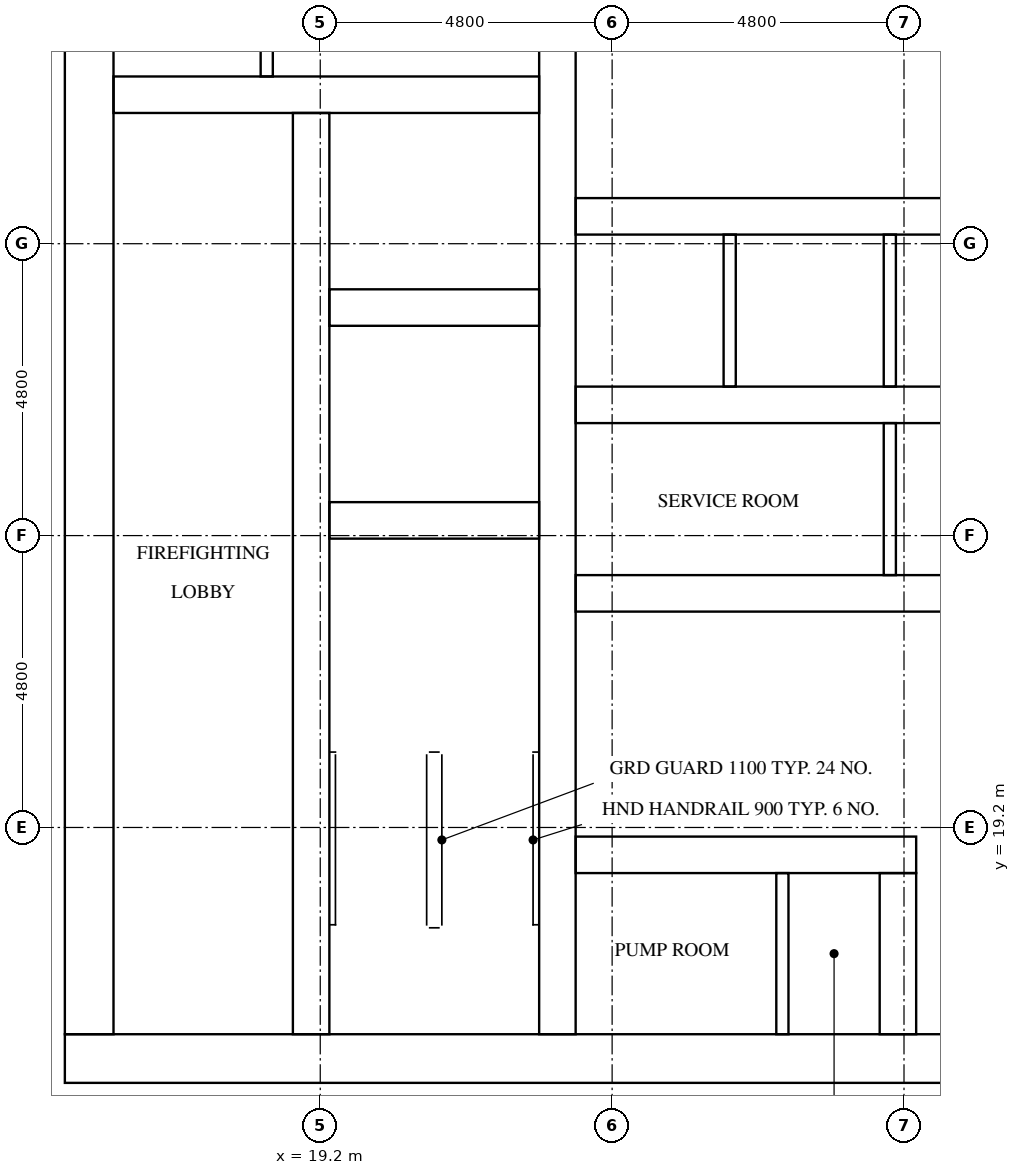
"""IFC4 building model, lengths in metres.
Left out: names, types, materials, properties, quantities, classifications, styles, units other than length and angle.
Written with IfcOpenShell. Run it as: python <this file> out.ifc"""

import sys

from ifc_helpers import new_model, si_unit, direction, frame, frame_2d, origin, place, context, subcontext, project, spatial, rectangle, extrude, element, fill, save


model = new_model("IFC4")
c1 = context("Model", 3, precision=1e-05, world=origin(), true_north=direction((0.0, 1.0)))
c2 = subcontext(c1, "Body", "Model", "MODEL_VIEW")
j1 = project(units=[si_unit("LENGTHUNIT", "METRE"), si_unit("PLANEANGLEUNIT", "RADIAN")], contexts=[c1])
p1 = place(None, origin())
s1 = spatial("IfcSite", under=j1, at=p1, CompositionType="ELEMENT")
p2 = place(p1, origin())
s2 = spatial("IfcBuilding", under=s1, at=p2, CompositionType="ELEMENT")
p3 = place(p2, frame((0.0, 0.0, 149.0)))
s3 = spatial("IfcBuildingStorey", under=s2, at=p3, CompositionType="ELEMENT", Elevation=149.0)
p4 = place(p3, frame((15.0, 15.4, 0.0), z_axis=(0.0, 0.0, 1.0), x_axis=(1.0, 0.0, 0.0)))
e1 = element("IfcWall", 1, at=p4, inside=s3, PredefinedType="SHEAR", context=c2, shape_type="SweptSolid", body=[
    extrude(rectangle(XDim=32.4, YDim=0.8, at=frame_2d((16.2, 0.0))), origin(), (0.0, 0.0, 1.0), 3.2),
])
p5 = place(p4, frame((15.3, 0.0, 0.0)))
e2 = element("IfcOpeningElement", 2, at=p5, cuts=e1, PredefinedType="OPENING", context=c2, shape_type="SweptSolid", body=[
    extrude(rectangle(XDim=1.8, YDim=2.1, at=frame_2d((0.9, 1.05))), frame((0.0, 0.41, 0.0), z_axis=(0.0, -1.0, 0.0), x_axis=(1.0, 0.0, 0.0)), (0.0, 0.0, 1.0), 0.82),
])
p6 = place(p3, frame((15.4, 15.8, 0.0), z_axis=(0.0, 0.0, 1.0), x_axis=(0.0, 1.0, 0.0)))
e3 = element("IfcWall", 3, at=p6, inside=s3, PredefinedType="SHEAR", context=c2, shape_type="SweptSolid", body=[
    extrude(rectangle(XDim=21.2, YDim=0.8, at=frame_2d((10.6, 0.0))), origin(), (0.0, 0.0, 1.0), 3.2),
])
p7 = place(p6, frame((4.96, 0.0, 0.0)))
e4 = element("IfcOpeningElement", 4, at=p7, cuts=e3, PredefinedType="OPENING", context=c2, shape_type="SweptSolid", body=[
    extrude(rectangle(XDim=1.2, YDim=2.1, at=frame_2d((0.6, 1.05))), frame((0.0, 0.41, 0.0), z_axis=(0.0, -1.0, 0.0), x_axis=(1.0, 0.0, 0.0)), (0.0, 0.0, 1.0), 0.82),
])
p8 = place(p3, frame((19.05, 15.8, 0.0), z_axis=(0.0, 0.0, 1.0), x_axis=(0.0, 1.0, 0.0)))
e5 = element("IfcWall", 5, at=p8, inside=s3, PredefinedType="SHEAR", context=c2, shape_type="SweptSolid", body=[
    extrude(rectangle(XDim=15.15, YDim=0.6, at=frame_2d((7.575, 0.0))), origin(), (0.0, 0.0, 1.0), 3.2),
])
p9 = place(p8, frame((9.65, 0.0, 0.0)))
e6 = element("IfcOpeningElement", 6, at=p9, cuts=e5, PredefinedType="OPENING", context=c2, shape_type="SweptSolid", body=[
    extrude(rectangle(XDim=1.1, YDim=2.1, at=frame_2d((0.55, 1.05))), frame((0.0, 0.31, 0.0), z_axis=(0.0, -1.0, 0.0), x_axis=(1.0, 0.0, 0.0)), (0.0, 0.0, 1.0), 0.62),
])
p10 = place(p8, frame((13.15, 0.0, 0.0)))
e7 = element("IfcOpeningElement", 7, at=p10, cuts=e5, PredefinedType="OPENING", context=c2, shape_type="SweptSolid", body=[
    extrude(rectangle(XDim=1.1, YDim=2.1, at=frame_2d((0.55, 1.05))), frame((0.0, 0.31, 0.0), z_axis=(0.0, -1.0, 0.0), x_axis=(1.0, 0.0, 0.0)), (0.0, 0.0, 1.0), 0.62),
])
p11 = place(p8, frame((0.4, 0.0, 0.0)))
e8 = element("IfcOpeningElement", 8, at=p11, cuts=e5, PredefinedType="OPENING", context=c2, shape_type="SweptSolid", body=[
    extrude(rectangle(XDim=1.2, YDim=2.1, at=frame_2d((0.6, 1.05))), frame((0.0, 0.31, 0.0), z_axis=(0.0, -1.0, 0.0), x_axis=(1.0, 0.0, 0.0)), (0.0, 0.0, 1.0), 0.62),
])
p12 = place(p3, frame((23.1, 15.8, 0.0), z_axis=(0.0, 0.0, 1.0), x_axis=(0.0, 1.0, 0.0)))
e9 = element("IfcWall", 9, at=p12, inside=s3, PredefinedType="SHEAR", context=c2, shape_type="SweptSolid", body=[
    extrude(rectangle(XDim=21.2, YDim=0.6, at=frame_2d((10.6, 0.0))), origin(), (0.0, 0.0, 1.0), 3.2),
])
for number, where, z_axis, x_axis in (
    (10, (19.35, 24.25, 0.0), (0.0, 0.0, 1.0), (1.0, 0.0, 0.0)),
    (11, (19.35, 27.75, 0.0), (0.0, 0.0, 1.0), (1.0, 0.0, 0.0)),
):
    element("IfcWall", number, at=place(p3, frame(where, z_axis=z_axis, x_axis=x_axis)), inside=s3, PredefinedType="SHEAR", context=c2, shape_type="SweptSolid", body=[
        extrude(rectangle(XDim=3.45, YDim=0.6, at=frame_2d((1.725, 0.0))), origin(), (0.0, 0.0, 1.0), 3.2),
    ])
p13 = place(p3, frame((15.8, 31.25, 0.0), z_axis=(0.0, 0.0, 1.0), x_axis=(1.0, 0.0, 0.0)))
e12 = element("IfcWall", 12, at=p13, inside=s3, PredefinedType="SHEAR", context=c2, shape_type="SweptSolid", body=[
    extrude(rectangle(XDim=7.0, YDim=0.6, at=frame_2d((3.5, 0.0))), origin(), (0.0, 0.0, 1.0), 3.2),
])
p14 = place(p3, frame((23.4, 18.75, 0.0), z_axis=(0.0, 0.0, 1.0), x_axis=(1.0, 0.0, 0.0)))
e13 = element("IfcWall", 13, at=p14, inside=s3, PredefinedType="SHEAR", context=c2, shape_type="SweptSolid", body=[
    extrude(rectangle(XDim=5.6, YDim=0.6, at=frame_2d((2.8, 0.0))), origin(), (0.0, 0.0, 1.0), 3.2),
])
p15 = place(p14, frame((1.15, 0.0, 0.0)))
e14 = element("IfcOpeningElement", 14, at=p15, cuts=e13, PredefinedType="OPENING", context=c2, shape_type="SweptSolid", body=[
    extrude(rectangle(XDim=1.0, YDim=2.1, at=frame_2d((0.5, 1.05))), frame((0.0, 0.31, 0.0), z_axis=(0.0, -1.0, 0.0), x_axis=(1.0, 0.0, 0.0)), (0.0, 0.0, 1.0), 0.62),
])
p16 = place(p14, frame((3.75, 0.0, 0.0)))
e15 = element("IfcOpeningElement", 15, at=p16, cuts=e13, PredefinedType="OPENING", context=c2, shape_type="SweptSolid", body=[
    extrude(rectangle(XDim=1.0, YDim=2.1, at=frame_2d((0.5, 1.05))), frame((0.0, 0.31, 0.0), z_axis=(0.0, -1.0, 0.0), x_axis=(1.0, 0.0, 0.0)), (0.0, 0.0, 1.0), 0.62),
])
p17 = place(p3, frame((23.4, 23.05, 0.0), z_axis=(0.0, 0.0, 1.0), x_axis=(1.0, 0.0, 0.0)))
e16 = element("IfcWall", 16, at=p17, inside=s3, PredefinedType="SHEAR", context=c2, shape_type="SweptSolid", body=[
    extrude(rectangle(XDim=15.6, YDim=0.6, at=frame_2d((7.8, 0.0))), origin(), (0.0, 0.0, 1.0), 3.2),
])
p18 = place(p17, frame((2.033, 0.0, 0.0)))
e17 = element("IfcOpeningElement", 17, at=p18, cuts=e16, PredefinedType="OPENING", context=c2, shape_type="SweptSolid", body=[
    extrude(rectangle(XDim=1.0, YDim=2.1, at=frame_2d((0.5, 1.05))), frame((0.0, 0.31, 0.0), z_axis=(0.0, -1.0, 0.0), x_axis=(1.0, 0.0, 0.0)), (0.0, 0.0, 1.0), 0.62),
])
p19 = place(p17, frame((11.706, 0.0, 0.0)))
e18 = element("IfcOpeningElement", 18, at=p19, cuts=e16, PredefinedType="OPENING", context=c2, shape_type="SweptSolid", body=[
    extrude(rectangle(XDim=1.0, YDim=2.1, at=frame_2d((0.5, 1.05))), frame((0.0, 0.31, 0.0), z_axis=(0.0, -1.0, 0.0), x_axis=(1.0, 0.0, 0.0)), (0.0, 0.0, 1.0), 0.62),
])
p20 = place(p17, frame((14.339, 0.0, 0.0)))
e19 = element("IfcOpeningElement", 19, at=p20, cuts=e16, PredefinedType="OPENING", context=c2, shape_type="SweptSolid", body=[
    extrude(rectangle(XDim=1.0, YDim=2.1, at=frame_2d((0.5, 1.05))), frame((0.0, 0.31, 0.0), z_axis=(0.0, -1.0, 0.0), x_axis=(1.0, 0.0, 0.0)), (0.0, 0.0, 1.0), 0.62),
])
p21 = place(p3, frame((23.4, 26.15, 0.0), z_axis=(0.0, 0.0, 1.0), x_axis=(1.0, 0.0, 0.0)))
e20 = element("IfcWall", 20, at=p21, inside=s3, PredefinedType="SHEAR", context=c2, shape_type="SweptSolid", body=[
    extrude(rectangle(XDim=15.6, YDim=0.6, at=frame_2d((7.8, 0.0))), origin(), (0.0, 0.0, 1.0), 3.2),
])
p22 = place(p3, frame((23.4, 29.25, 0.0), z_axis=(0.0, 0.0, 1.0), x_axis=(1.0, 0.0, 0.0)))
e21 = element("IfcWall", 21, at=p22, inside=s3, PredefinedType="SHEAR", context=c2, shape_type="SweptSolid", body=[
    extrude(rectangle(XDim=15.6, YDim=0.6, at=frame_2d((7.8, 0.0))), origin(), (0.0, 0.0, 1.0), 3.2),
])
p23 = place(p22, frame((0.667, 0.0, 0.0)))
e22 = element("IfcOpeningElement", 22, at=p23, cuts=e21, PredefinedType="OPENING", context=c2, shape_type="SweptSolid", body=[
    extrude(rectangle(XDim=1.1, YDim=2.1, at=frame_2d((0.55, 1.05))), frame((0.0, 0.31, 0.0), z_axis=(0.0, -1.0, 0.0), x_axis=(1.0, 0.0, 0.0)), (0.0, 0.0, 1.0), 0.62),
])
p24 = place(p22, frame((3.3, 0.0, 0.0)))
e23 = element("IfcOpeningElement", 23, at=p24, cuts=e21, PredefinedType="OPENING", context=c2, shape_type="SweptSolid", body=[
    extrude(rectangle(XDim=1.1, YDim=2.1, at=frame_2d((0.55, 1.05))), frame((0.0, 0.31, 0.0), z_axis=(0.0, -1.0, 0.0), x_axis=(1.0, 0.0, 0.0)), (0.0, 0.0, 1.0), 0.62),
])
p25 = place(p22, frame((5.933, 0.0, 0.0)))
e24 = element("IfcOpeningElement", 24, at=p25, cuts=e21, PredefinedType="OPENING", context=c2, shape_type="SweptSolid", body=[
    extrude(rectangle(XDim=1.1, YDim=2.1, at=frame_2d((0.55, 1.05))), frame((0.0, 0.31, 0.0), z_axis=(0.0, -1.0, 0.0), x_axis=(1.0, 0.0, 0.0)), (0.0, 0.0, 1.0), 0.62),
])
p26 = place(p22, frame((8.567, 0.0, 0.0)))
e25 = element("IfcOpeningElement", 25, at=p26, cuts=e21, PredefinedType="OPENING", context=c2, shape_type="SweptSolid", body=[
    extrude(rectangle(XDim=1.1, YDim=2.1, at=frame_2d((0.55, 1.05))), frame((0.0, 0.31, 0.0), z_axis=(0.0, -1.0, 0.0), x_axis=(1.0, 0.0, 0.0)), (0.0, 0.0, 1.0), 0.62),
])
p27 = place(p22, frame((11.2, 0.0, 0.0)))
e26 = element("IfcOpeningElement", 26, at=p27, cuts=e21, PredefinedType="OPENING", context=c2, shape_type="SweptSolid", body=[
    extrude(rectangle(XDim=1.1, YDim=2.1, at=frame_2d((0.55, 1.05))), frame((0.0, 0.31, 0.0), z_axis=(0.0, -1.0, 0.0), x_axis=(1.0, 0.0, 0.0)), (0.0, 0.0, 1.0), 0.62),
])
p28 = place(p22, frame((13.833, 0.0, 0.0)))
e27 = element("IfcOpeningElement", 27, at=p28, cuts=e21, PredefinedType="OPENING", context=c2, shape_type="SweptSolid", body=[
    extrude(rectangle(XDim=1.1, YDim=2.1, at=frame_2d((0.55, 1.05))), frame((0.0, 0.31, 0.0), z_axis=(0.0, -1.0, 0.0), x_axis=(1.0, 0.0, 0.0)), (0.0, 0.0, 1.0), 0.62),
])
p29 = place(p3, frame((28.7, 15.8, 0.0), z_axis=(0.0, 0.0, 1.0), x_axis=(0.0, 1.0, 0.0)))
e28 = element("IfcWall", 28, at=p29, inside=s3, PredefinedType="SHEAR", context=c2, shape_type="SweptSolid", body=[
    extrude(rectangle(XDim=2.65, YDim=0.6, at=frame_2d((1.325, 0.0))), origin(), (0.0, 0.0, 1.0), 3.2),
])
for number, where, z_axis, x_axis in (
    (29, (25.933, 26.45, 0.0), (0.0, 0.0, 1.0), (0.0, 1.0, 0.0)),
    (30, (28.567, 23.35, 0.0), (0.0, 0.0, 1.0), (0.0, 1.0, 0.0)),
    (31, (28.567, 26.45, 0.0), (0.0, 0.0, 1.0), (0.0, 1.0, 0.0)),
):
    element("IfcWall", number, at=place(p3, frame(where, z_axis=z_axis, x_axis=x_axis)), inside=s3, PredefinedType="SOLIDWALL", context=c2, shape_type="SweptSolid", body=[
        extrude(rectangle(XDim=2.5, YDim=0.2, at=frame_2d((1.25, 0.0))), origin(), (0.0, 0.0, 1.0), 3.2),
    ])
p30 = place(p3, frame((18.32, 31.55, 0.0), z_axis=(0.0, 0.0, 1.0), x_axis=(0.0, 1.0, 0.0)))
e32 = element("IfcWall", 32, at=p30, inside=s3, PredefinedType="PARTITIONING", context=c2, shape_type="SweptSolid", body=[
    extrude(rectangle(XDim=5.45, YDim=0.2, at=frame_2d((2.725, 0.0))), origin(), (0.0, 0.0, 1.0), 3.2),
])
p31 = place(p3, frame((26.8, 15.8, 0.0), z_axis=(0.0, 0.0, 1.0), x_axis=(0.0, 1.0, 0.0)))
e33 = element("IfcWall", 33, at=p31, inside=s3, PredefinedType="PARTITIONING", context=c2, shape_type="SweptSolid", body=[
    extrude(rectangle(XDim=2.65, YDim=0.2, at=frame_2d((1.325, 0.0))), origin(), (0.0, 0.0, 1.0), 3.2),
])
p32 = place(p23, origin())
e34 = element("IfcDoor", 34, at=p32, inside=s3, OperationType="DOUBLE_DOOR_SLIDING", PredefinedType="DOOR", context=c2, shape_type="SweptSolid", body=[
    extrude(rectangle(XDim=1.1, YDim=2.1, at=frame_2d((0.55, 1.05))), frame((0.0, 0.025, 0.0), z_axis=(0.0, -1.0, 0.0), x_axis=(1.0, 0.0, 0.0)), (0.0, 0.0, 1.0), 0.05),
])
fill(e22, e34)
p33 = place(p24, origin())
e35 = element("IfcDoor", 35, at=p33, inside=s3, OperationType="DOUBLE_DOOR_SLIDING", PredefinedType="DOOR", context=c2, shape_type="SweptSolid", body=[
    extrude(rectangle(XDim=1.1, YDim=2.1, at=frame_2d((0.55, 1.05))), frame((0.0, 0.025, 0.0), z_axis=(0.0, -1.0, 0.0), x_axis=(1.0, 0.0, 0.0)), (0.0, 0.0, 1.0), 0.05),
])
fill(e23, e35)
p34 = place(p25, origin())
e36 = element("IfcDoor", 36, at=p34, inside=s3, OperationType="DOUBLE_DOOR_SLIDING", PredefinedType="DOOR", context=c2, shape_type="SweptSolid", body=[
    extrude(rectangle(XDim=1.1, YDim=2.1, at=frame_2d((0.55, 1.05))), frame((0.0, 0.025, 0.0), z_axis=(0.0, -1.0, 0.0), x_axis=(1.0, 0.0, 0.0)), (0.0, 0.0, 1.0), 0.05),
])
fill(e24, e36)
p35 = place(p9, origin())
e37 = element("IfcDoor", 37, at=p35, inside=s3, OperationType="DOUBLE_DOOR_SLIDING", PredefinedType="DOOR", context=c2, shape_type="SweptSolid", body=[
    extrude(rectangle(XDim=1.1, YDim=2.1, at=frame_2d((0.55, 1.05))), frame((0.0, 0.025, 0.0), z_axis=(0.0, -1.0, 0.0), x_axis=(1.0, 0.0, 0.0)), (0.0, 0.0, 1.0), 0.05),
])
fill(e6, e37)
p36 = place(p10, origin())
e38 = element("IfcDoor", 38, at=p36, inside=s3, OperationType="DOUBLE_DOOR_SLIDING", PredefinedType="DOOR", context=c2, shape_type="SweptSolid", body=[
    extrude(rectangle(XDim=1.1, YDim=2.1, at=frame_2d((0.55, 1.05))), frame((0.0, 0.025, 0.0), z_axis=(0.0, -1.0, 0.0), x_axis=(1.0, 0.0, 0.0)), (0.0, 0.0, 1.0), 0.05),
])
fill(e7, e38)
p37 = place(p11, frame((1.2, 0.0, 0.0), z_axis=(0.0, 0.0, 1.0), x_axis=(-1.0, 0.0, 0.0)))
e39 = element("IfcDoor", 39, at=p37, inside=s3, OperationType="SINGLE_SWING_RIGHT", PredefinedType="DOOR", context=c2, shape_type="SweptSolid", body=[
    extrude(rectangle(XDim=1.2, YDim=2.1, at=frame_2d((0.6, 1.05))), frame((0.0, 0.025, 0.0), z_axis=(0.0, -1.0, 0.0), x_axis=(1.0, 0.0, 0.0)), (0.0, 0.0, 1.0), 0.05),
])
fill(e8, e39)
p38 = place(p7, frame((1.2, 0.0, 0.0), z_axis=(0.0, 0.0, 1.0), x_axis=(-1.0, 0.0, 0.0)))
e40 = element("IfcDoor", 40, at=p38, inside=s3, OperationType="SINGLE_SWING_LEFT", PredefinedType="DOOR", context=c2, shape_type="SweptSolid", body=[
    extrude(rectangle(XDim=1.2, YDim=2.1, at=frame_2d((0.6, 1.05))), frame((0.0, 0.025, 0.0), z_axis=(0.0, -1.0, 0.0), x_axis=(1.0, 0.0, 0.0)), (0.0, 0.0, 1.0), 0.05),
])
fill(e4, e40)
p39 = place(p18, frame((1.0, 0.0, 0.0), z_axis=(0.0, 0.0, 1.0), x_axis=(-1.0, 0.0, 0.0)))
e41 = element("IfcDoor", 41, at=p39, inside=s3, OperationType="SINGLE_SWING_LEFT", PredefinedType="DOOR", context=c2, shape_type="SweptSolid", body=[
    extrude(rectangle(XDim=1.0, YDim=2.1, at=frame_2d((0.5, 1.05))), frame((0.0, 0.025, 0.0), z_axis=(0.0, -1.0, 0.0), x_axis=(1.0, 0.0, 0.0)), (0.0, 0.0, 1.0), 0.05),
])
fill(e17, e41)
p40 = place(p15, origin())
e42 = element("IfcDoor", 42, at=p40, inside=s3, OperationType="SINGLE_SWING_RIGHT", PredefinedType="DOOR", context=c2, shape_type="SweptSolid", body=[
    extrude(rectangle(XDim=1.0, YDim=2.1, at=frame_2d((0.5, 1.05))), frame((0.0, 0.025, 0.0), z_axis=(0.0, -1.0, 0.0), x_axis=(1.0, 0.0, 0.0)), (0.0, 0.0, 1.0), 0.05),
])
fill(e14, e42)
p41 = place(p16, origin())
e43 = element("IfcDoor", 43, at=p41, inside=s3, OperationType="SINGLE_SWING_LEFT", PredefinedType="DOOR", context=c2, shape_type="SweptSolid", body=[
    extrude(rectangle(XDim=1.0, YDim=2.1, at=frame_2d((0.5, 1.05))), frame((0.0, 0.025, 0.0), z_axis=(0.0, -1.0, 0.0), x_axis=(1.0, 0.0, 0.0)), (0.0, 0.0, 1.0), 0.05),
])
fill(e15, e43)
save(model, sys.argv[1])
